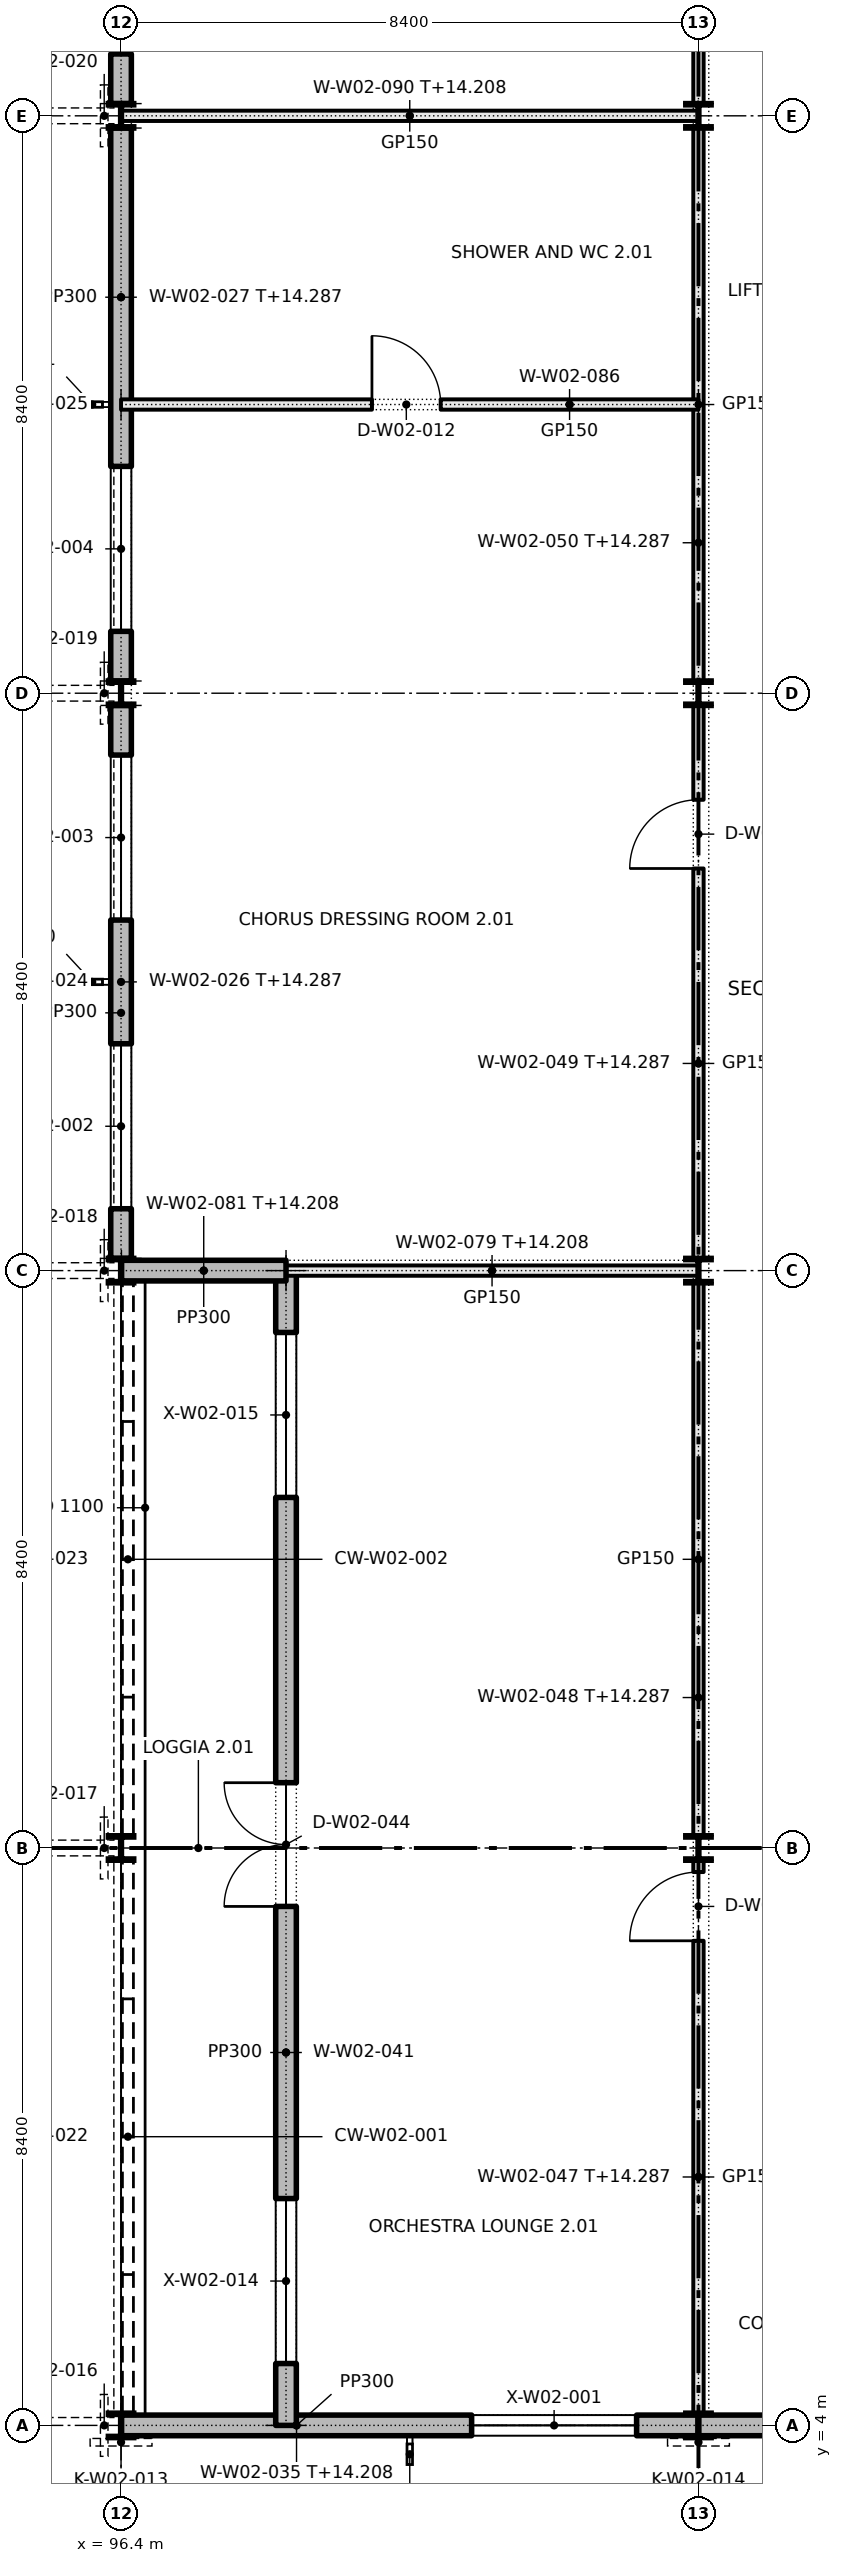
"""IFC4 building model, lengths in metres.
Left out: names, types, materials, properties, quantities, classifications, styles, units other than length and angle.
Written with IfcOpenShell. Run it as: python <this file> out.ifc"""

import sys

from ifc_helpers import new_model, si_unit, direction, frame, frame_2d, origin, origin_2d, place, context, subcontext, project, spatial, rectangle, i_section, extrude, element, fill, save


model = new_model("IFC4")
c1 = context("Model", 3, precision=1e-05, world=origin(), true_north=direction((0.0, 1.0)))
c2 = subcontext(c1, "Body", "Model", "MODEL_VIEW")
j1 = project(units=[si_unit("LENGTHUNIT", "METRE"), si_unit("PLANEANGLEUNIT", "RADIAN")], contexts=[c1])
p1 = place(None, origin())
s1 = spatial("IfcSite", under=j1, at=p1, CompositionType="ELEMENT")
p2 = place(p1, origin())
s2 = spatial("IfcBuilding", under=s1, at=p2, CompositionType="ELEMENT")
p3 = place(p2, frame((0.0, 0.0, 10.2)))
s3 = spatial("IfcBuildingStorey", under=s2, at=p3, CompositionType="ELEMENT", Elevation=10.2)
for number, where, z_axis, x_axis in (
    (1, (96.4, 4.0, 0.0), (0.0, 0.0, 1.0), (1.0, 0.0, 0.0)),
    (2, (96.4, 12.4, 0.0), (0.0, 0.0, 1.0), (1.0, 0.0, 0.0)),
    (3, (96.4, 20.8, 0.0), (0.0, 0.0, 1.0), (1.0, 0.0, 0.0)),
    (4, (96.4, 29.2, 0.0), (0.0, 0.0, 1.0), (1.0, 0.0, 0.0)),
    (5, (96.4, 37.6, 0.0), (0.0, 0.0, 1.0), (1.0, 0.0, 0.0)),
    (6, (104.8, 4.0, 0.0), (0.0, 0.0, 1.0), (1.0, 0.0, 0.0)),
    (7, (104.8, 12.4, 0.0), (0.0, 0.0, 1.0), (1.0, 0.0, 0.0)),
    (8, (104.8, 20.8, 0.0), (0.0, 0.0, 1.0), (1.0, 0.0, 0.0)),
    (9, (104.8, 29.2, 0.0), (0.0, 0.0, 1.0), (1.0, 0.0, 0.0)),
    (10, (104.8, 37.6, 0.0), (0.0, 0.0, 1.0), (1.0, 0.0, 0.0)),
):
    element("IfcColumn", number, at=place(p3, frame(where, z_axis=z_axis, x_axis=x_axis)), inside=s3, PredefinedType="COLUMN", context=c2, shape_type="SweptSolid", body=[
        extrude(i_section(OverallWidth=0.368, OverallDepth=0.356, WebThickness=0.011, FlangeThickness=0.018, FilletRadius=0.015, at=origin_2d()), origin(), (0.0, 0.0, 1.0), 4.8),
    ])
p4 = place(p3, frame((96.4, 20.978, 0.0), z_axis=(0.0, 0.0, 1.0), x_axis=(0.0, 1.0, 0.0)))
e11 = element("IfcWall", 11, at=p4, inside=s3, PredefinedType="SOLIDWALL", context=c2, shape_type="SweptSolid", body=[
    extrude(rectangle(XDim=8.044, YDim=0.3, at=frame_2d((4.022, 0.0))), origin(), (0.0, 0.0, 1.0), 4.087),
])
p5 = place(p4, frame((0.722, 0.0, 0.95)))
e12 = element("IfcOpeningElement", 12, at=p5, cuts=e11, PredefinedType="OPENING", context=c2, shape_type="SweptSolid", body=[
    extrude(rectangle(XDim=2.4, YDim=1.8, at=frame_2d((1.2, 0.9))), frame((0.0, 0.16, 0.0), z_axis=(0.0, -1.0, 0.0), x_axis=(1.0, 0.0, 0.0)), (0.0, 0.0, 1.0), 0.32),
])
p6 = place(p4, frame((4.922, 0.0, 0.95)))
e13 = element("IfcOpeningElement", 13, at=p6, cuts=e11, PredefinedType="OPENING", context=c2, shape_type="SweptSolid", body=[
    extrude(rectangle(XDim=2.4, YDim=1.8, at=frame_2d((1.2, 0.9))), frame((0.0, 0.16, 0.0), z_axis=(0.0, -1.0, 0.0), x_axis=(1.0, 0.0, 0.0)), (0.0, 0.0, 1.0), 0.32),
])
p7 = place(p3, frame((96.4, 29.378, 0.0), z_axis=(0.0, 0.0, 1.0), x_axis=(0.0, 1.0, 0.0)))
e14 = element("IfcWall", 14, at=p7, inside=s3, PredefinedType="SOLIDWALL", context=c2, shape_type="SweptSolid", body=[
    extrude(rectangle(XDim=8.044, YDim=0.3, at=frame_2d((4.022, 0.0))), origin(), (0.0, 0.0, 1.0), 4.087),
])
p8 = place(p7, frame((0.722, 0.0, 0.95)))
e15 = element("IfcOpeningElement", 15, at=p8, cuts=e14, PredefinedType="OPENING", context=c2, shape_type="SweptSolid", body=[
    extrude(rectangle(XDim=2.4, YDim=1.8, at=frame_2d((1.2, 0.9))), frame((0.0, 0.16, 0.0), z_axis=(0.0, -1.0, 0.0), x_axis=(1.0, 0.0, 0.0)), (0.0, 0.0, 1.0), 0.32),
])
p9 = place(p3, frame((96.4, 37.778, 0.0), z_axis=(0.0, 0.0, 1.0), x_axis=(0.0, 1.0, 0.0)))
e16 = element("IfcWall", 16, at=p9, inside=s3, PredefinedType="SOLIDWALL", context=c2, shape_type="SweptSolid", body=[
    extrude(rectangle(XDim=8.044, YDim=0.3, at=frame_2d((4.022, 0.0))), origin(), (0.0, 0.0, 1.0), 4.087),
])
p10 = place(p9, frame((0.722, 0.0, 0.95)))
e17 = element("IfcOpeningElement", 17, at=p10, cuts=e16, PredefinedType="OPENING", context=c2, shape_type="SweptSolid", body=[
    extrude(rectangle(XDim=2.4, YDim=1.8, at=frame_2d((1.2, 0.9))), frame((0.0, 0.16, 0.0), z_axis=(0.0, -1.0, 0.0), x_axis=(1.0, 0.0, 0.0)), (0.0, 0.0, 1.0), 0.32),
])
p11 = place(p9, frame((4.922, 0.0, 0.95)))
e18 = element("IfcOpeningElement", 18, at=p11, cuts=e16, PredefinedType="OPENING", context=c2, shape_type="SweptSolid", body=[
    extrude(rectangle(XDim=2.4, YDim=1.8, at=frame_2d((1.2, 0.9))), frame((0.0, 0.16, 0.0), z_axis=(0.0, -1.0, 0.0), x_axis=(1.0, 0.0, 0.0)), (0.0, 0.0, 1.0), 0.32),
])
p12 = place(p3, frame((96.406, 4.0, 0.0), z_axis=(0.0, 0.0, 1.0), x_axis=(1.0, 0.0, 0.0)))
e19 = element("IfcWall", 19, at=p12, inside=s3, PredefinedType="SOLIDWALL", context=c2, shape_type="SweptSolid", body=[
    extrude(rectangle(XDim=8.4, YDim=0.3, at=frame_2d((4.2, 0.0))), origin(), (0.0, 0.0, 1.0), 4.008),
])
p13 = place(p12, frame((5.094, 0.0, 0.95)))
e20 = element("IfcOpeningElement", 20, at=p13, cuts=e19, PredefinedType="OPENING", context=c2, shape_type="SweptSolid", body=[
    extrude(rectangle(XDim=2.4, YDim=1.8, at=frame_2d((1.2, 0.9))), frame((0.0, 0.16, 0.0), z_axis=(0.0, -1.0, 0.0), x_axis=(1.0, 0.0, 0.0)), (0.0, 0.0, 1.0), 0.32),
])
p14 = place(p3, frame((104.794, 4.0, 0.0), z_axis=(0.0, 0.0, 1.0), x_axis=(1.0, 0.0, 0.0)))
e21 = element("IfcWall", 21, at=p14, inside=s3, PredefinedType="SOLIDWALL", context=c2, shape_type="SweptSolid", body=[
    extrude(rectangle(XDim=8.4, YDim=0.3, at=frame_2d((4.2, 0.0))), origin(), (0.0, 0.0, 1.0), 4.008),
])
p15 = place(p3, frame((98.8, 4.0, 0.0), z_axis=(0.0, 0.0, 1.0), x_axis=(0.0, 1.0, 0.0)))
e22 = element("IfcWall", 22, at=p15, inside=s3, PredefinedType="SOLIDWALL", context=c2, shape_type="SweptSolid", body=[
    extrude(rectangle(XDim=16.8, YDim=0.3, at=frame_2d((8.4, 0.0))), origin(), (0.0, 0.0, 1.0), 4.8),
])
p16 = place(p15, frame((7.55, 0.0, 0.0)))
e23 = element("IfcOpeningElement", 23, at=p16, cuts=e22, PredefinedType="OPENING", context=c2, shape_type="SweptSolid", body=[
    extrude(rectangle(XDim=1.8, YDim=2.1, at=frame_2d((0.9, 1.05))), frame((0.0, 0.16, 0.0), z_axis=(0.0, -1.0, 0.0), x_axis=(1.0, 0.0, 0.0)), (0.0, 0.0, 1.0), 0.32),
])
p17 = place(p15, frame((0.9, 0.0, 0.95)))
e24 = element("IfcOpeningElement", 24, at=p17, cuts=e22, PredefinedType="OPENING", context=c2, shape_type="SweptSolid", body=[
    extrude(rectangle(XDim=2.4, YDim=1.8, at=frame_2d((1.2, 0.9))), frame((0.0, 0.16, 0.0), z_axis=(0.0, -1.0, 0.0), x_axis=(1.0, 0.0, 0.0)), (0.0, 0.0, 1.0), 0.32),
])
p18 = place(p15, frame((13.5, 0.0, 0.95)))
e25 = element("IfcOpeningElement", 25, at=p18, cuts=e22, PredefinedType="OPENING", context=c2, shape_type="SweptSolid", body=[
    extrude(rectangle(XDim=2.4, YDim=1.8, at=frame_2d((1.2, 0.9))), frame((0.0, 0.16, 0.0), z_axis=(0.0, -1.0, 0.0), x_axis=(1.0, 0.0, 0.0)), (0.0, 0.0, 1.0), 0.32),
])
p19 = place(p3, frame((104.8, 4.178, 0.0), z_axis=(0.0, 0.0, 1.0), x_axis=(0.0, 1.0, 0.0)))
e26 = element("IfcWall", 26, at=p19, inside=s3, PredefinedType="PARTITIONING", context=c2, shape_type="SweptSolid", body=[
    extrude(rectangle(XDim=8.044, YDim=0.15, at=frame_2d((4.022, 0.0))), origin(), (0.0, 0.0, 1.0), 4.087),
])
p20 = place(p19, frame((6.872, 0.0, 0.0)))
e27 = element("IfcOpeningElement", 27, at=p20, cuts=e26, PredefinedType="OPENING", context=c2, shape_type="SweptSolid", body=[
    extrude(rectangle(XDim=1.0, YDim=2.1, at=frame_2d((0.5, 1.05))), frame((0.0, 0.085, 0.0), z_axis=(0.0, -1.0, 0.0), x_axis=(1.0, 0.0, 0.0)), (0.0, 0.0, 1.0), 0.17),
])
p21 = place(p3, frame((104.8, 12.578, 0.0), z_axis=(0.0, 0.0, 1.0), x_axis=(0.0, 1.0, 0.0)))
e28 = element("IfcWall", 28, at=p21, inside=s3, PredefinedType="PARTITIONING", context=c2, shape_type="SweptSolid", body=[
    extrude(rectangle(XDim=8.044, YDim=0.15, at=frame_2d((4.022, 0.0))), origin(), (0.0, 0.0, 1.0), 4.087),
])
p22 = place(p3, frame((104.8, 20.978, 0.0), z_axis=(0.0, 0.0, 1.0), x_axis=(0.0, 1.0, 0.0)))
e29 = element("IfcWall", 29, at=p22, inside=s3, PredefinedType="PARTITIONING", context=c2, shape_type="SweptSolid", body=[
    extrude(rectangle(XDim=8.044, YDim=0.15, at=frame_2d((4.022, 0.0))), origin(), (0.0, 0.0, 1.0), 4.087),
])
p23 = place(p22, frame((5.672, 0.0, 0.0)))
e30 = element("IfcOpeningElement", 30, at=p23, cuts=e29, PredefinedType="OPENING", context=c2, shape_type="SweptSolid", body=[
    extrude(rectangle(XDim=1.0, YDim=2.1, at=frame_2d((0.5, 1.05))), frame((0.0, 0.085, 0.0), z_axis=(0.0, -1.0, 0.0), x_axis=(1.0, 0.0, 0.0)), (0.0, 0.0, 1.0), 0.17),
])
p24 = place(p3, frame((104.8, 29.378, 0.0), z_axis=(0.0, 0.0, 1.0), x_axis=(0.0, 1.0, 0.0)))
e31 = element("IfcWall", 31, at=p24, inside=s3, PredefinedType="PARTITIONING", context=c2, shape_type="SweptSolid", body=[
    extrude(rectangle(XDim=8.044, YDim=0.15, at=frame_2d((4.022, 0.0))), origin(), (0.0, 0.0, 1.0), 4.087),
])
p25 = place(p3, frame((104.8, 37.778, 0.0), z_axis=(0.0, 0.0, 1.0), x_axis=(0.0, 1.0, 0.0)))
e32 = element("IfcWall", 32, at=p25, inside=s3, PredefinedType="PARTITIONING", context=c2, shape_type="SweptSolid", body=[
    extrude(rectangle(XDim=8.044, YDim=0.15, at=frame_2d((4.022, 0.0))), origin(), (0.0, 0.0, 1.0), 4.087),
])
p26 = place(p25, frame((5.672, 0.0, 0.0)))
e33 = element("IfcOpeningElement", 33, at=p26, cuts=e32, PredefinedType="OPENING", context=c2, shape_type="SweptSolid", body=[
    extrude(rectangle(XDim=1.0, YDim=2.1, at=frame_2d((0.5, 1.05))), frame((0.0, 0.085, 0.0), z_axis=(0.0, -1.0, 0.0), x_axis=(1.0, 0.0, 0.0)), (0.0, 0.0, 1.0), 0.17),
])
p27 = place(p3, frame((98.8, 20.8, 0.0), z_axis=(0.0, 0.0, 1.0), x_axis=(1.0, 0.0, 0.0)))
e34 = element("IfcWall", 34, at=p27, inside=s3, PredefinedType="PARTITIONING", context=c2, shape_type="SweptSolid", body=[
    extrude(rectangle(XDim=5.994, YDim=0.15, at=frame_2d((2.997, 0.0))), origin(), (0.0, 0.0, 1.0), 4.008),
])
p28 = place(p3, frame((96.406, 20.8, 0.0), z_axis=(0.0, 0.0, 1.0), x_axis=(1.0, 0.0, 0.0)))
e35 = element("IfcWall", 35, at=p28, inside=s3, PredefinedType="SOLIDWALL", context=c2, shape_type="SweptSolid", body=[
    extrude(rectangle(XDim=2.395, YDim=0.3, at=frame_2d((1.197, 0.0))), origin(), (0.0, 0.0, 1.0), 4.008),
])
p29 = place(p3, frame((96.4, 33.4, 0.0), z_axis=(0.0, 0.0, 1.0), x_axis=(1.0, 0.0, 0.0)))
e36 = element("IfcWall", 36, at=p29, inside=s3, PredefinedType="PARTITIONING", context=c2, shape_type="SweptSolid", body=[
    extrude(rectangle(XDim=8.4, YDim=0.15, at=frame_2d((4.2, 0.0))), origin(), (0.0, 0.0, 1.0), 4.8),
])
p30 = place(p29, frame((3.65, 0.0, 0.0)))
e37 = element("IfcOpeningElement", 37, at=p30, cuts=e36, PredefinedType="OPENING", context=c2, shape_type="SweptSolid", body=[
    extrude(rectangle(XDim=1.0, YDim=2.1, at=frame_2d((0.5, 1.05))), frame((0.0, 0.085, 0.0), z_axis=(0.0, -1.0, 0.0), x_axis=(1.0, 0.0, 0.0)), (0.0, 0.0, 1.0), 0.17),
])
p31 = place(p3, frame((96.406, 37.6, 0.0), z_axis=(0.0, 0.0, 1.0), x_axis=(1.0, 0.0, 0.0)))
e38 = element("IfcWall", 38, at=p31, inside=s3, PredefinedType="PARTITIONING", context=c2, shape_type="SweptSolid", body=[
    extrude(rectangle(XDim=8.389, YDim=0.15, at=frame_2d((4.194, 0.0))), origin(), (0.0, 0.0, 1.0), 4.008),
])
p32 = place(p13, origin())
e39 = element("IfcWindow", 39, at=p32, inside=s3, PartitioningType="DOUBLE_PANEL_VERTICAL", PredefinedType="WINDOW", context=c2, shape_type="SweptSolid", body=[
    extrude(rectangle(XDim=2.4, YDim=1.8, at=frame_2d((1.2, 0.9))), frame((0.0, 0.03, 0.0), z_axis=(0.0, -1.0, 0.0), x_axis=(1.0, 0.0, 0.0)), (0.0, 0.0, 1.0), 0.06),
])
fill(e20, e39)
p33 = place(p5, origin())
e40 = element("IfcWindow", 40, at=p33, inside=s3, PartitioningType="DOUBLE_PANEL_VERTICAL", PredefinedType="WINDOW", context=c2, shape_type="SweptSolid", body=[
    extrude(rectangle(XDim=2.4, YDim=1.8, at=frame_2d((1.2, 0.9))), frame((0.0, 0.03, 0.0), z_axis=(0.0, -1.0, 0.0), x_axis=(1.0, 0.0, 0.0)), (0.0, 0.0, 1.0), 0.06),
])
fill(e12, e40)
p34 = place(p6, origin())
e41 = element("IfcWindow", 41, at=p34, inside=s3, PartitioningType="DOUBLE_PANEL_VERTICAL", PredefinedType="WINDOW", context=c2, shape_type="SweptSolid", body=[
    extrude(rectangle(XDim=2.4, YDim=1.8, at=frame_2d((1.2, 0.9))), frame((0.0, 0.03, 0.0), z_axis=(0.0, -1.0, 0.0), x_axis=(1.0, 0.0, 0.0)), (0.0, 0.0, 1.0), 0.06),
])
fill(e13, e41)
p35 = place(p8, origin())
e42 = element("IfcWindow", 42, at=p35, inside=s3, PartitioningType="DOUBLE_PANEL_VERTICAL", PredefinedType="WINDOW", context=c2, shape_type="SweptSolid", body=[
    extrude(rectangle(XDim=2.4, YDim=1.8, at=frame_2d((1.2, 0.9))), frame((0.0, 0.03, 0.0), z_axis=(0.0, -1.0, 0.0), x_axis=(1.0, 0.0, 0.0)), (0.0, 0.0, 1.0), 0.06),
])
fill(e15, e42)
p36 = place(p10, origin())
e43 = element("IfcWindow", 43, at=p36, inside=s3, PartitioningType="DOUBLE_PANEL_VERTICAL", PredefinedType="WINDOW", context=c2, shape_type="SweptSolid", body=[
    extrude(rectangle(XDim=2.4, YDim=1.8, at=frame_2d((1.2, 0.9))), frame((0.0, 0.03, 0.0), z_axis=(0.0, -1.0, 0.0), x_axis=(1.0, 0.0, 0.0)), (0.0, 0.0, 1.0), 0.06),
])
fill(e17, e43)
p37 = place(p20, origin())
e44 = element("IfcDoor", 44, at=p37, inside=s3, OperationType="SINGLE_SWING_LEFT", PredefinedType="DOOR", context=c2, shape_type="SweptSolid", body=[
    extrude(rectangle(XDim=1.0, YDim=2.1, at=frame_2d((0.5, 1.05))), frame((0.0, 0.025, 0.0), z_axis=(0.0, -1.0, 0.0), x_axis=(1.0, 0.0, 0.0)), (0.0, 0.0, 1.0), 0.05),
])
fill(e27, e44)
p38 = place(p23, origin())
e45 = element("IfcDoor", 45, at=p38, inside=s3, OperationType="SINGLE_SWING_LEFT", PredefinedType="DOOR", context=c2, shape_type="SweptSolid", body=[
    extrude(rectangle(XDim=1.0, YDim=2.1, at=frame_2d((0.5, 1.05))), frame((0.0, 0.025, 0.0), z_axis=(0.0, -1.0, 0.0), x_axis=(1.0, 0.0, 0.0)), (0.0, 0.0, 1.0), 0.05),
])
fill(e30, e45)
p39 = place(p30, origin())
e46 = element("IfcDoor", 46, at=p39, inside=s3, OperationType="SINGLE_SWING_LEFT", PredefinedType="DOOR", context=c2, shape_type="SweptSolid", body=[
    extrude(rectangle(XDim=1.0, YDim=2.1, at=frame_2d((0.5, 1.05))), frame((0.0, 0.025, 0.0), z_axis=(0.0, -1.0, 0.0), x_axis=(1.0, 0.0, 0.0)), (0.0, 0.0, 1.0), 0.05),
])
fill(e37, e46)
p40 = place(p16, origin())
e47 = element("IfcDoor", 47, at=p40, inside=s3, OperationType="DOUBLE_DOOR_SINGLE_SWING", PredefinedType="DOOR", context=c2, shape_type="SweptSolid", body=[
    extrude(rectangle(XDim=1.8, YDim=2.1, at=frame_2d((0.9, 1.05))), frame((0.0, 0.025, 0.0), z_axis=(0.0, -1.0, 0.0), x_axis=(1.0, 0.0, 0.0)), (0.0, 0.0, 1.0), 0.05),
])
fill(e23, e47)
p41 = place(p17, origin())
e48 = element("IfcWindow", 48, at=p41, inside=s3, PartitioningType="DOUBLE_PANEL_VERTICAL", PredefinedType="WINDOW", context=c2, shape_type="SweptSolid", body=[
    extrude(rectangle(XDim=2.4, YDim=1.8, at=frame_2d((1.2, 0.9))), frame((0.0, 0.03, 0.0), z_axis=(0.0, -1.0, 0.0), x_axis=(1.0, 0.0, 0.0)), (0.0, 0.0, 1.0), 0.06),
])
fill(e24, e48)
p42 = place(p18, origin())
e49 = element("IfcWindow", 49, at=p42, inside=s3, PartitioningType="DOUBLE_PANEL_VERTICAL", PredefinedType="WINDOW", context=c2, shape_type="SweptSolid", body=[
    extrude(rectangle(XDim=2.4, YDim=1.8, at=frame_2d((1.2, 0.9))), frame((0.0, 0.03, 0.0), z_axis=(0.0, -1.0, 0.0), x_axis=(1.0, 0.0, 0.0)), (0.0, 0.0, 1.0), 0.06),
])
fill(e25, e49)
save(model, sys.argv[1])
